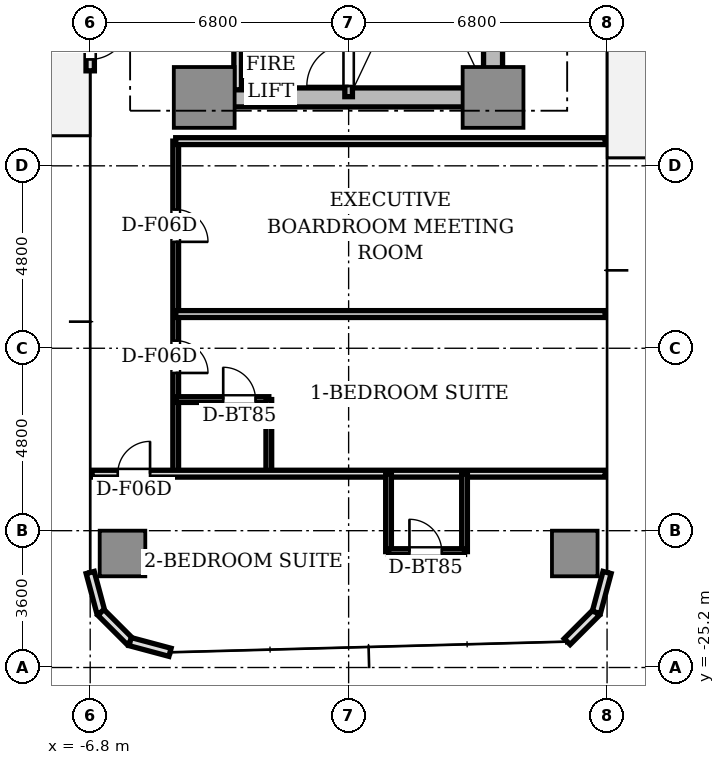
"""IFC4 building model, lengths in metres.
Left out: names, types, materials, properties, quantities, classifications, styles, units other than length and angle.
Written with IfcOpenShell. Run it as: python <this file> out.ifc"""

import sys

from ifc_helpers import new_model, si_unit, direction, frame, frame_2d, origin, origin_2d, place, context, subcontext, project, spatial, rectangle, extrude, source, transform, mapped, element, fill, save


model = new_model("IFC4")
c1 = context("Model", 3, precision=1e-05, world=origin(), true_north=direction((0.0, 1.0)))
c2 = subcontext(c1, "Body", "Model", "MODEL_VIEW")
j1 = project(units=[si_unit("LENGTHUNIT", "METRE"), si_unit("PLANEANGLEUNIT", "RADIAN")], contexts=[c1])
p1 = place(None, origin())
s1 = spatial("IfcSite", under=j1, at=p1, CompositionType="ELEMENT")
p2 = place(p1, origin())
s2 = spatial("IfcBuilding", under=s1, at=p2, CompositionType="ELEMENT")
p3 = place(p2, frame((0.0, 0.0, 57.75)))
s3 = spatial("IfcBuildingStorey", under=s2, at=p3, CompositionType="ELEMENT", Elevation=57.75)
p4 = place(p3, frame((-3.55, -10.2, 0.0), z_axis=(0.0, 0.0, 1.0), x_axis=(1.0, 0.0, 0.0)))
e1 = element("IfcWall", 1, at=p4, inside=s3, PredefinedType="SHEAR", context=c2, shape_type="SweptSolid", body=[
    extrude(rectangle(XDim=7.1, YDim=0.5, at=frame_2d((3.55, 0.0))), origin(), (0.0, 0.0, 1.0), 3.11),
])
p5 = place(p3, frame((3.8, -9.75, 0.0), z_axis=(0.0, 0.0, 1.0), x_axis=(0.0, 1.0, 0.0)))
e2 = element("IfcWall", 2, at=p5, inside=s3, PredefinedType="SHEAR", context=c2, shape_type="SweptSolid", body=[
    extrude(rectangle(XDim=6.9, YDim=0.5, at=frame_2d((3.45, 0.0))), origin(), (0.0, 0.0, 1.0), 3.11),
])
m1 = source(origin(), c2, "Body", "SweptSolid", [
    extrude(rectangle(XDim=1.6, YDim=1.6, at=origin_2d()), origin(), (0.0, 0.0, 1.0), 3.11),
])
for number, where, z_axis, x_axis in (
    (3, (-3.8, -10.2, 0.0), (0.0, 0.0, 1.0), (1.0, 0.0, 0.0)),
    (4, (3.8, -10.2, 0.0), (0.0, 0.0, 1.0), (1.0, 0.0, 0.0)),
):
    element("IfcColumn", number, at=place(p3, frame(where, z_axis=z_axis, x_axis=x_axis)), inside=s3, PredefinedType="COLUMN", context=c2, shape_type="MappedRepresentation", body=[
        mapped(m1, transform((0.0, 0.0, 0.0), scale=1.0)),
    ])
m2 = source(origin(), c2, "Body", "SweptSolid", [
    extrude(rectangle(XDim=1.2, YDim=1.2, at=origin_2d()), origin(), (0.0, 0.0, 1.0), 3.11),
])
for number, where, z_axis, x_axis in (
    (5, (-5.95, -22.2, 0.0), (0.0, 0.0, 1.0), (1.0, 0.0, 0.0)),
    (6, (5.95, -22.2, 0.0), (0.0, 0.0, 1.0), (1.0, 0.0, 0.0)),
):
    element("IfcColumn", number, at=place(p3, frame(where, z_axis=z_axis, x_axis=x_axis)), inside=s3, PredefinedType="COLUMN", context=c2, shape_type="MappedRepresentation", body=[
        mapped(m2, transform((0.0, 0.0, 0.0), scale=1.0)),
    ])
p6 = place(p3, frame((-6.8, -6.8, 0.0), z_axis=(0.0, 0.0, 1.0), x_axis=(0.0, -1.0, 0.0)))
e7 = element("IfcWall", 7, at=p6, inside=s3, PredefinedType="STANDARD", context=c2, shape_type="SweptSolid", body=[
    extrude(rectangle(XDim=2.7, YDim=0.22, at=frame_2d((1.35, 0.0))), origin(), (0.0, 0.0, 1.0), 3.11),
])
p7 = place(p6, frame((1.4, 0.0, 0.0)))
e8 = element("IfcOpeningElement", 8, at=p7, cuts=e7, PredefinedType="OPENING", context=c2, shape_type="SweptSolid", body=[
    extrude(rectangle(XDim=1.0, YDim=2.2, at=frame_2d((0.5, 1.1))), frame((0.0, 0.12, 0.0), z_axis=(0.0, -1.0, 0.0), x_axis=(1.0, 0.0, 0.0)), (0.0, 0.0, 1.0), 0.24),
])
for number, where, z_axis, x_axis in (
    (9, (-6.8, -22.7, 0.0), (0.0, 0.0, 1.0), (0.259, -0.966, 0.0)),
    (10, (-6.519, -23.75, 0.0), (0.0, 0.0, 1.0), (0.707, -0.707, 0.0)),
    (11, (-5.75, -24.519, 0.0), (0.0, 0.0, 1.0), (0.966, -0.259, 0.0)),
    (12, (5.75, -24.519, 0.0), (0.0, 0.0, 1.0), (0.707, 0.707, 0.0)),
    (13, (6.519, -23.75, 0.0), (0.0, 0.0, 1.0), (0.259, 0.966, 0.0)),
):
    element("IfcWall", number, at=place(p3, frame(where, z_axis=z_axis, x_axis=x_axis)), inside=s3, PredefinedType="STANDARD", context=c2, shape_type="SweptSolid", body=[
        extrude(rectangle(XDim=1.087, YDim=0.22, at=frame_2d((0.543, 0.0))), origin(), (0.0, 0.0, 1.0), 3.11),
    ])
p8 = place(p3, frame((0.0, -10.18, 0.0), z_axis=(0.0, 0.0, 1.0), x_axis=(0.0, 1.0, 0.0)))
e14 = element("IfcWall", 14, at=p8, inside=s3, PredefinedType="SOLIDWALL", context=c2, shape_type="SweptSolid", body=[
    extrude(rectangle(XDim=7.68, YDim=0.2, at=frame_2d((3.84, 0.0))), origin(), (0.0, 0.0, 1.0), 3.11),
])
p9 = place(p8, frame((0.28, 0.0, 0.0)))
e15 = element("IfcOpeningElement", 15, at=p9, cuts=e14, PredefinedType="OPENING", context=c2, shape_type="SweptSolid", body=[
    extrude(rectangle(XDim=1.1, YDim=2.15, at=frame_2d((0.55, 1.075))), frame((0.0, 0.11, 0.0), z_axis=(0.0, -1.0, 0.0), x_axis=(1.0, 0.0, 0.0)), (0.0, 0.0, 1.0), 0.22),
])
p10 = place(p3, frame((-2.92, -10.0, 0.0), z_axis=(0.0, 0.0, 1.0), x_axis=(0.0, 1.0, 0.0)))
e16 = element("IfcWall", 16, at=p10, inside=s3, PredefinedType="SOLIDWALL", context=c2, shape_type="SweptSolid", body=[
    extrude(rectangle(XDim=1.44, YDim=0.2, at=frame_2d((0.72, 0.0))), origin(), (0.0, 0.0, 1.0), 2.66),
])
p11 = place(p3, frame((-4.55, -11.35, 0.0), z_axis=(0.0, 0.0, 1.0), x_axis=(0.0, -1.0, 0.0)))
e17 = element("IfcWall", 17, at=p11, inside=s3, PredefinedType="PARTITIONING", context=c2, shape_type="SweptSolid", body=[
    extrude(rectangle(XDim=8.75, YDim=0.15, at=frame_2d((4.375, 0.0))), origin(), (0.0, 0.0, 1.0), 2.63),
])
p12 = place(p11, frame((1.8, 0.0, 0.0)))
e18 = element("IfcOpeningElement", 18, at=p12, cuts=e17, PredefinedType="OPENING", context=c2, shape_type="SweptSolid", body=[
    extrude(rectangle(XDim=0.85, YDim=2.1, at=frame_2d((0.425, 1.05))), frame((0.0, 0.085, 0.0), z_axis=(0.0, -1.0, 0.0), x_axis=(1.0, 0.0, 0.0)), (0.0, 0.0, 1.0), 0.17),
])
p13 = place(p11, frame((5.25, 0.0, 0.0)))
e19 = element("IfcOpeningElement", 19, at=p13, cuts=e17, PredefinedType="OPENING", context=c2, shape_type="SweptSolid", body=[
    extrude(rectangle(XDim=0.85, YDim=2.1, at=frame_2d((0.425, 1.05))), frame((0.0, 0.085, 0.0), z_axis=(0.0, -1.0, 0.0), x_axis=(1.0, 0.0, 0.0)), (0.0, 0.0, 1.0), 0.17),
])
for number, where, z_axis, x_axis in (
    (20, (-4.55, -11.35, 0.0), (0.0, 0.0, 1.0), (1.0, 0.0, 0.0)),
    (21, (-4.55, -15.9, 0.0), (0.0, 0.0, 1.0), (1.0, 0.0, 0.0)),
):
    element("IfcWall", number, at=place(p3, frame(where, z_axis=z_axis, x_axis=x_axis)), inside=s3, PredefinedType="PARTITIONING", context=c2, shape_type="SweptSolid", body=[
        extrude(rectangle(XDim=11.3, YDim=0.18, at=frame_2d((5.65, 0.0))), origin(), (0.0, 0.0, 1.0), 2.66),
    ])
p14 = place(p3, frame((-4.55, -18.15, 0.0), z_axis=(0.0, 0.0, 1.0), x_axis=(1.0, 0.0, 0.0)))
e22 = element("IfcWall", 22, at=p14, inside=s3, PredefinedType="PARTITIONING", context=c2, shape_type="SweptSolid", body=[
    extrude(rectangle(XDim=2.45, YDim=0.15, at=frame_2d((1.225, 0.0))), origin(), (0.0, 0.0, 1.0), 2.66),
])
p15 = place(p14, frame((1.25, 0.0, 0.0)))
e23 = element("IfcOpeningElement", 23, at=p15, cuts=e22, PredefinedType="OPENING", context=c2, shape_type="SweptSolid", body=[
    extrude(rectangle(XDim=0.85, YDim=2.1, at=frame_2d((0.425, 1.05))), frame((0.0, 0.085, 0.0), z_axis=(0.0, -1.0, 0.0), x_axis=(1.0, 0.0, 0.0)), (0.0, 0.0, 1.0), 0.17),
])
p16 = place(p3, frame((-2.1, -18.15, 0.0), z_axis=(0.0, 0.0, 1.0), x_axis=(0.0, -1.0, 0.0)))
e24 = element("IfcWall", 24, at=p16, inside=s3, PredefinedType="PARTITIONING", context=c2, shape_type="SweptSolid", body=[
    extrude(rectangle(XDim=1.95, YDim=0.15, at=frame_2d((0.975, 0.0))), origin(), (0.0, 0.0, 1.0), 2.66),
])
p17 = place(p3, frame((-6.75, -20.1, 0.0), z_axis=(0.0, 0.0, 1.0), x_axis=(1.0, 0.0, 0.0)))
e25 = element("IfcWall", 25, at=p17, inside=s3, PredefinedType="PARTITIONING", context=c2, shape_type="SweptSolid", body=[
    extrude(rectangle(XDim=13.5, YDim=0.18, at=frame_2d((6.75, 0.0))), origin(), (0.0, 0.0, 1.0), 2.66),
])
p18 = place(p17, frame((0.675, 0.0, 0.0)))
e26 = element("IfcOpeningElement", 26, at=p18, cuts=e25, PredefinedType="OPENING", context=c2, shape_type="SweptSolid", body=[
    extrude(rectangle(XDim=0.85, YDim=2.1, at=frame_2d((0.425, 1.05))), frame((0.0, 0.1, 0.0), z_axis=(0.0, -1.0, 0.0), x_axis=(1.0, 0.0, 0.0)), (0.0, 0.0, 1.0), 0.2),
])
for number, where, z_axis, x_axis in (
    (27, (3.05, -20.1, 0.0), (0.0, 0.0, 1.0), (0.0, -1.0, 0.0)),
    (28, (1.05, -20.1, 0.0), (0.0, 0.0, 1.0), (0.0, -1.0, 0.0)),
):
    element("IfcWall", number, at=place(p3, frame(where, z_axis=z_axis, x_axis=x_axis)), inside=s3, PredefinedType="PARTITIONING", context=c2, shape_type="SweptSolid", body=[
        extrude(rectangle(XDim=2.05, YDim=0.15, at=frame_2d((1.025, 0.0))), origin(), (0.0, 0.0, 1.0), 2.66),
    ])
p19 = place(p3, frame((1.05, -22.15, 0.0), z_axis=(0.0, 0.0, 1.0), x_axis=(1.0, 0.0, 0.0)))
e29 = element("IfcWall", 29, at=p19, inside=s3, PredefinedType="PARTITIONING", context=c2, shape_type="SweptSolid", body=[
    extrude(rectangle(XDim=2.0, YDim=0.15, at=frame_2d((1.0, 0.0))), origin(), (0.0, 0.0, 1.0), 2.58),
])
p20 = place(p19, frame((0.55, 0.0, 0.0)))
e30 = element("IfcOpeningElement", 30, at=p20, cuts=e29, PredefinedType="OPENING", context=c2, shape_type="SweptSolid", body=[
    extrude(rectangle(XDim=0.85, YDim=2.1, at=frame_2d((0.425, 1.05))), frame((0.0, 0.085, 0.0), z_axis=(0.0, -1.0, 0.0), x_axis=(1.0, 0.0, 0.0)), (0.0, 0.0, 1.0), 0.17),
])
m3 = source(origin(), c2, "Body", "SweptSolid", [
    extrude(rectangle(XDim=1.0, YDim=0.05, at=origin_2d()), origin(), (0.0, 0.0, 1.0), 2.2),
])
p21 = place(p7, frame((0.5, 0.0, 0.0)))
e31 = element("IfcDoor", 31, at=p21, inside=s3, OperationType="SINGLE_SWING_LEFT", PredefinedType="DOOR", context=c2, shape_type="MappedRepresentation", body=[
    mapped(m3, transform((0.0, 0.0, 0.0), scale=1.0)),
])
fill(e8, e31)
m4 = source(origin(), c2, "Body", "SweptSolid", [
    extrude(rectangle(XDim=1.1, YDim=0.05, at=origin_2d()), origin(), (0.0, 0.0, 1.0), 2.15),
])
p22 = place(p9, frame((0.55, 0.0, 0.0)))
e32 = element("IfcDoor", 32, at=p22, inside=s3, OperationType="SINGLE_SWING_LEFT", PredefinedType="DOOR", context=c2, shape_type="MappedRepresentation", body=[
    mapped(m4, transform((0.0, 0.0, 0.0), scale=1.0)),
])
fill(e15, e32)
m5 = source(origin(), c2, "Body", "SweptSolid", [
    extrude(rectangle(XDim=0.85, YDim=0.05, at=origin_2d()), origin(), (0.0, 0.0, 1.0), 2.1),
])
p23 = place(p12, frame((0.425, 0.0, 0.0)))
e33 = element("IfcDoor", 33, at=p23, inside=s3, OperationType="SINGLE_SWING_RIGHT", PredefinedType="DOOR", context=c2, shape_type="MappedRepresentation", body=[
    mapped(m5, transform((0.0, 0.0, 0.0), scale=1.0)),
])
fill(e18, e33)
p24 = place(p15, frame((0.425, 0.0, 0.0)))
e34 = element("IfcDoor", 34, at=p24, inside=s3, OperationType="SINGLE_SWING_LEFT", PredefinedType="DOOR", context=c2, shape_type="MappedRepresentation", body=[
    mapped(m5, transform((0.0, 0.0, 0.0), scale=1.0)),
])
fill(e23, e34)
p25 = place(p13, frame((0.425, 0.0, 0.0)))
e35 = element("IfcDoor", 35, at=p25, inside=s3, OperationType="SINGLE_SWING_RIGHT", PredefinedType="DOOR", context=c2, shape_type="MappedRepresentation", body=[
    mapped(m5, transform((0.0, 0.0, 0.0), scale=1.0)),
])
fill(e19, e35)
p26 = place(p20, frame((0.425, 0.0, 0.0)))
e36 = element("IfcDoor", 36, at=p26, inside=s3, OperationType="SINGLE_SWING_LEFT", PredefinedType="DOOR", context=c2, shape_type="MappedRepresentation", body=[
    mapped(m5, transform((0.0, 0.0, 0.0), scale=1.0)),
])
fill(e30, e36)
p27 = place(p18, frame((0.425, 0.0, 0.0)))
e37 = element("IfcDoor", 37, at=p27, inside=s3, OperationType="SINGLE_SWING_RIGHT", PredefinedType="DOOR", context=c2, shape_type="MappedRepresentation", body=[
    mapped(m5, transform((0.0, 0.0, 0.0), scale=1.0)),
])
fill(e26, e37)
save(model, sys.argv[1])
